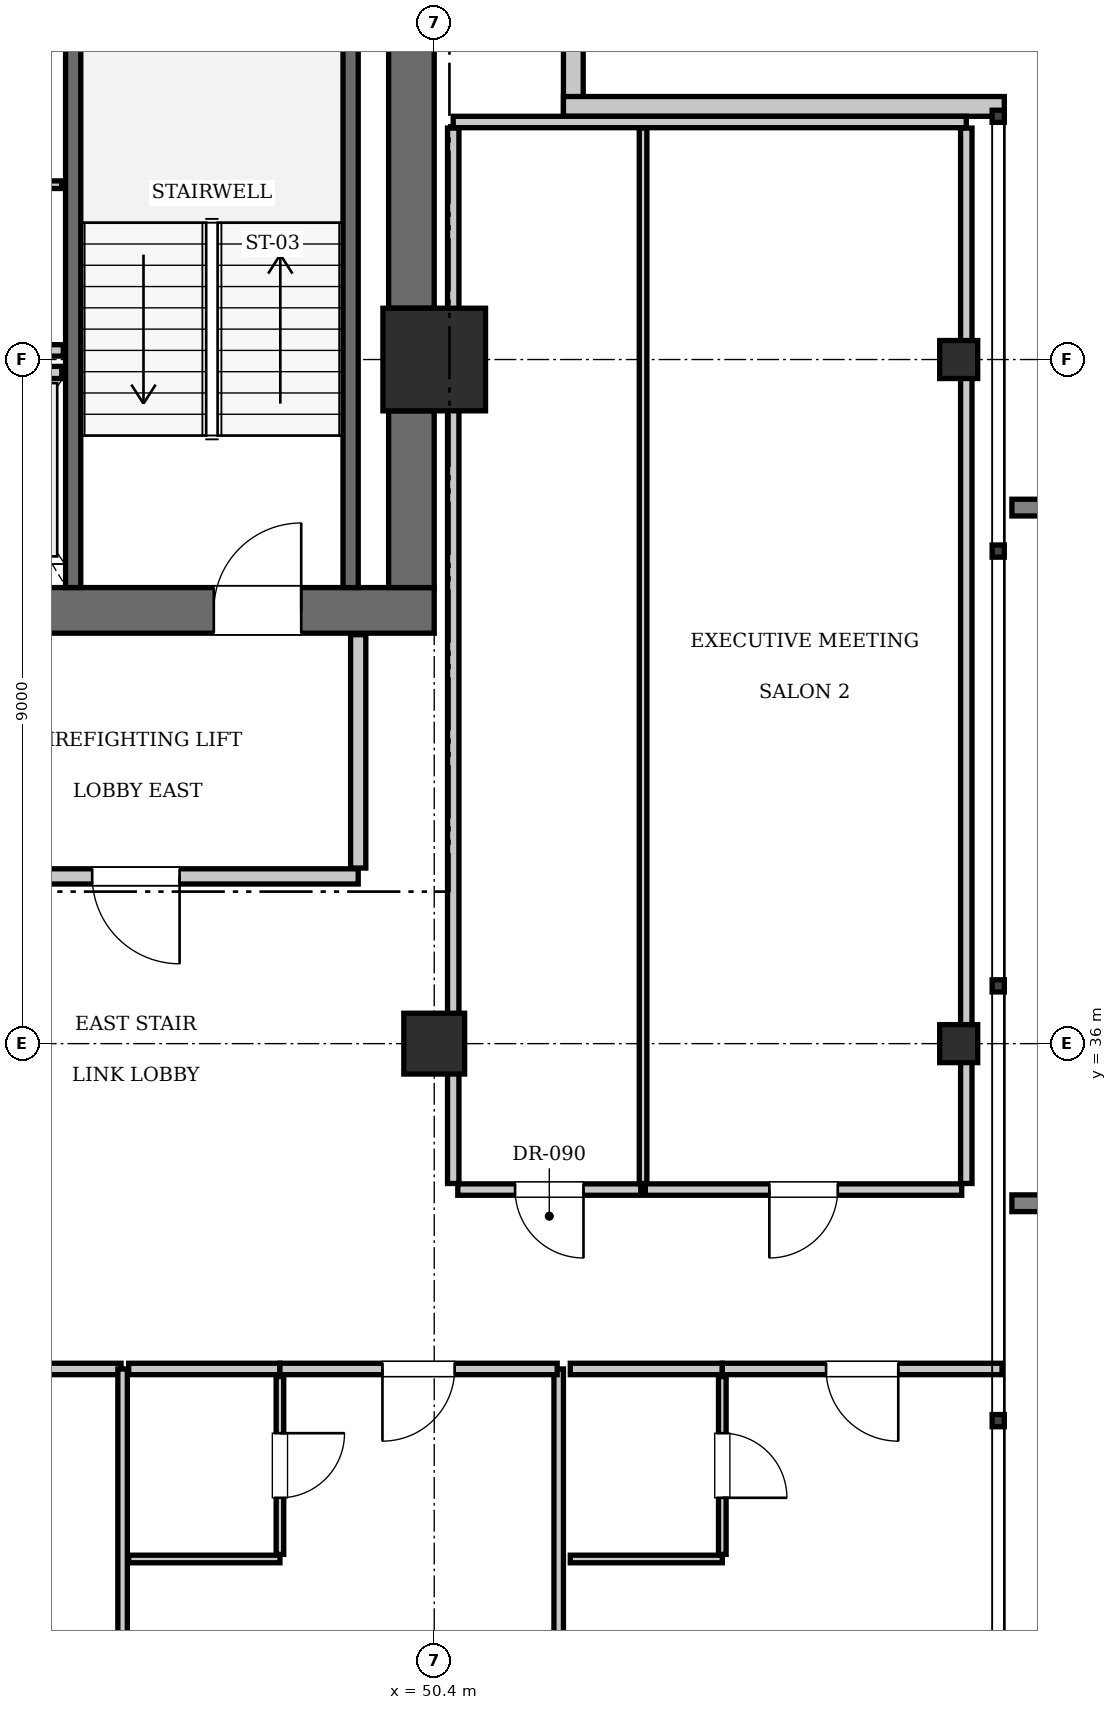
"""IFC4 building model, lengths in metres.
Left out: names, types, materials, properties, quantities, classifications, styles, units other than length and angle.
Written with IfcOpenShell. Run it as: python <this file> out.ifc"""

import sys

from ifc_helpers import new_model, si_unit, direction, frame, frame_2d, origin, origin_2d, place, context, subcontext, project, spatial, rectangle, i_section, extrude, element, fill, save


model = new_model("IFC4")
c1 = context("Model", 3, precision=1e-05, world=origin(), true_north=direction((0.0, 1.0)))
c2 = subcontext(c1, "Body", "Model", "MODEL_VIEW")
j1 = project(units=[si_unit("LENGTHUNIT", "METRE"), si_unit("PLANEANGLEUNIT", "RADIAN")], contexts=[c1])
p1 = place(None, origin())
s1 = spatial("IfcSite", under=j1, at=p1, CompositionType="ELEMENT")
p2 = place(p1, origin())
s2 = spatial("IfcBuilding", under=s1, at=p2, CompositionType="ELEMENT")
p3 = place(p2, frame((0.0, 0.0, 329.7)))
s3 = spatial("IfcBuildingStorey", under=s2, at=p3, CompositionType="ELEMENT", Elevation=329.7)
p4 = place(p3, frame((50.4, 45.0, 0.0), z_axis=(0.0, 0.0, 1.0), x_axis=(1.0, 0.0, 0.0)))
e1 = element("IfcColumn", 1, at=p4, inside=s3, PredefinedType="COLUMN", context=c2, shape_type="SweptSolid", body=[
    extrude(rectangle(XDim=1.35, YDim=1.35, at=origin_2d()), origin(), (0.0, 0.0, 1.0), 3.85),
])
p5 = place(p3, frame((43.6, 41.7, 0.0), z_axis=(0.0, 0.0, 1.0), x_axis=(1.0, 0.0, 0.0)))
e2 = element("IfcWall", 2, at=p5, inside=s3, PredefinedType="SHEAR", context=c2, shape_type="SweptSolid", body=[
    extrude(rectangle(XDim=6.8, YDim=0.6, at=frame_2d((3.4, 0.0))), origin(), (0.0, 0.0, 1.0), 3.85),
])
p6 = place(p5, frame((3.9, 0.0, 0.0)))
e3 = element("IfcOpeningElement", 3, at=p6, cuts=e2, PredefinedType="OPENING", context=c2, shape_type="SweptSolid", body=[
    extrude(rectangle(XDim=1.15, YDim=2.15, at=frame_2d((0.575, 1.075))), frame((0.0, 0.31, 0.0), z_axis=(0.0, -1.0, 0.0), x_axis=(1.0, 0.0, 0.0)), (0.0, 0.0, 1.0), 0.62),
])
p7 = place(p5, frame((0.55, 0.0, 0.0)))
e4 = element("IfcOpeningElement", 4, at=p7, cuts=e2, PredefinedType="OPENING", context=c2, shape_type="SweptSolid", body=[
    extrude(rectangle(XDim=1.1, YDim=2.2, at=frame_2d((0.55, 1.1))), frame((0.0, 0.31, 0.0), z_axis=(0.0, -1.0, 0.0), x_axis=(1.0, 0.0, 0.0)), (0.0, 0.0, 1.0), 0.62),
])
p8 = place(p3, frame((50.1, 42.0, 0.0), z_axis=(0.0, 0.0, 1.0), x_axis=(0.0, 1.0, 0.0)))
e5 = element("IfcWall", 5, at=p8, inside=s3, PredefinedType="SHEAR", context=c2, shape_type="SweptSolid", body=[
    extrude(rectangle(XDim=2.325, YDim=0.6, at=frame_2d((1.163, 0.0))), origin(), (0.0, 0.0, 1.0), 3.85),
])
p9 = place(p3, frame((50.1, 45.675, 0.0), z_axis=(0.0, 0.0, 1.0), x_axis=(0.0, 1.0, 0.0)))
e6 = element("IfcWall", 6, at=p9, inside=s3, PredefinedType="SHEAR", context=c2, shape_type="SweptSolid", body=[
    extrude(rectangle(XDim=7.725, YDim=0.6, at=frame_2d((3.862, 0.0))), origin(), (0.0, 0.0, 1.0), 3.85),
])
p10 = place(p3, frame((50.4, 36.0, 0.0), z_axis=(0.0, 0.0, 1.0), x_axis=(1.0, 0.0, 0.0)))
e7 = element("IfcColumn", 7, at=p10, inside=s3, PredefinedType="COLUMN", context=c2, shape_type="SweptSolid", body=[
    extrude(rectangle(XDim=0.8, YDim=0.8, at=origin_2d()), origin(), (0.0, 0.0, 1.0), 3.85),
])
for number, where, z_axis, x_axis in (
    (8, (57.3, 36.0, 0.0), (0.0, 0.0, 1.0), (1.0, 0.0, 0.0)),
    (9, (57.3, 45.0, 0.0), (0.0, 0.0, 1.0), (1.0, 0.0, 0.0)),
):
    element("IfcColumn", number, at=place(p3, frame(where, z_axis=z_axis, x_axis=x_axis)), inside=s3, PredefinedType="COLUMN", context=c2, shape_type="SweptSolid", body=[
        extrude(i_section(OverallWidth=0.5, OverallDepth=0.5, WebThickness=0.022, FlangeThickness=0.032, at=origin_2d()), origin(), (0.0, 0.0, 1.0), 3.85),
    ])
p11 = place(p3, frame((45.65, 42.0, 0.0), z_axis=(0.0, 0.0, 1.0), x_axis=(0.0, 1.0, 0.0)))
e10 = element("IfcWall", 10, at=p11, inside=s3, PredefinedType="SOLIDWALL", context=c2, shape_type="SweptSolid", body=[
    extrude(rectangle(XDim=9.15, YDim=0.2, at=frame_2d((4.575, 0.0))), origin(), (0.0, 0.0, 1.0), 3.61),
])
p12 = place(p3, frame((49.3, 42.0, 0.0), z_axis=(0.0, 0.0, 1.0), x_axis=(0.0, 1.0, 0.0)))
e11 = element("IfcWall", 11, at=p12, inside=s3, PredefinedType="SOLIDWALL", context=c2, shape_type="SweptSolid", body=[
    extrude(rectangle(XDim=9.12, YDim=0.2, at=frame_2d((4.56, 0.0))), origin(), (0.0, 0.0, 1.0), 3.61),
])
p13 = place(p3, frame((43.9, 44.83, 0.0), z_axis=(0.0, 0.0, 1.0), x_axis=(1.0, 0.0, 0.0)))
e12 = element("IfcWall", 12, at=p13, inside=s3, PredefinedType="SOLIDWALL", context=c2, shape_type="SweptSolid", body=[
    extrude(rectangle(XDim=1.6, YDim=0.16, at=frame_2d((0.8, 0.0))), origin(), (0.0, 0.0, 1.0), 3.61),
])
p14 = place(p3, frame((52.23, 54.0, 0.0), z_axis=(0.0, 0.0, 1.0), x_axis=(0.0, -1.0, 0.0)))
e13 = element("IfcWall", 13, at=p14, inside=s3, PredefinedType="SOLIDWALL", context=c2, shape_type="SweptSolid", body=[
    extrude(rectangle(XDim=5.8, YDim=0.26, at=frame_2d((2.9, 0.0))), origin(), (0.0, 0.0, 1.0), 3.61),
])
p15 = place(p3, frame((52.1, 48.33, 0.0), z_axis=(0.0, 0.0, 1.0), x_axis=(1.0, 0.0, 0.0)))
e14 = element("IfcWall", 14, at=p15, inside=s3, PredefinedType="SOLIDWALL", context=c2, shape_type="SweptSolid", body=[
    extrude(rectangle(XDim=5.8, YDim=0.26, at=frame_2d((2.9, 0.0))), origin(), (0.0, 0.0, 1.0), 3.61),
])
p16 = place(p3, frame((43.6, 38.2, 0.0), z_axis=(0.0, 0.0, 1.0), x_axis=(1.0, 0.0, 0.0)))
e15 = element("IfcWall", 15, at=p16, inside=s3, PredefinedType="PARTITIONING", context=c2, shape_type="SweptSolid", body=[
    extrude(rectangle(XDim=5.8, YDim=0.2, at=frame_2d((2.9, 0.0))), origin(), (0.0, 0.0, 1.0), 3.61),
])
p17 = place(p16, frame((2.3, 0.0, 0.0)))
e16 = element("IfcOpeningElement", 16, at=p17, cuts=e15, PredefinedType="OPENING", context=c2, shape_type="SweptSolid", body=[
    extrude(rectangle(XDim=1.15, YDim=2.15, at=frame_2d((0.575, 1.075))), frame((0.0, 0.11, 0.0), z_axis=(0.0, -1.0, 0.0), x_axis=(1.0, 0.0, 0.0)), (0.0, 0.0, 1.0), 0.22),
])
p18 = place(p3, frame((49.4, 38.31, 0.0), z_axis=(0.0, 0.0, 1.0), x_axis=(0.0, 1.0, 0.0)))
e17 = element("IfcWall", 17, at=p18, inside=s3, PredefinedType="PARTITIONING", context=c2, shape_type="SweptSolid", body=[
    extrude(rectangle(XDim=3.07, YDim=0.2, at=frame_2d((1.535, 0.0))), origin(), (0.0, 0.0, 1.0), 3.61),
])
p19 = place(p3, frame((42.4, 47.3, 0.0), z_axis=(0.0, 0.0, 1.0), x_axis=(1.0, 0.0, 0.0)))
e18 = element("IfcWall", 18, at=p19, inside=s3, PredefinedType="PARTITIONING", context=c2, shape_type="SweptSolid", body=[
    extrude(rectangle(XDim=3.1, YDim=0.1, at=frame_2d((1.55, 0.0))), origin(), (0.0, 0.0, 1.0), 3.61),
])
p20 = place(p3, frame((42.38, 45.12, 0.0), z_axis=(0.0, 0.0, 1.0), x_axis=(1.0, 0.0, 0.0)))
e19 = element("IfcWall", 19, at=p20, inside=s3, PredefinedType="PARTITIONING", context=c2, shape_type="SweptSolid", body=[
    extrude(rectangle(XDim=3.14, YDim=0.15, at=frame_2d((1.57, 0.0))), origin(), (0.0, 0.0, 1.0), 3.61),
])
p21 = place(p3, frame((50.65, 48.125, 0.0), z_axis=(0.0, 0.0, 1.0), x_axis=(1.0, 0.0, 0.0)))
e20 = element("IfcWall", 20, at=p21, inside=s3, PredefinedType="PARTITIONING", context=c2, shape_type="SweptSolid", body=[
    extrude(rectangle(XDim=6.75, YDim=0.15, at=frame_2d((3.375, 0.0))), origin(), (0.0, 0.0, 1.0), 3.61),
])
p22 = place(p3, frame((50.65, 34.16, 0.0), z_axis=(0.0, 0.0, 1.0), x_axis=(0.0, 1.0, 0.0)))
e21 = element("IfcWall", 21, at=p22, inside=s3, PredefinedType="PARTITIONING", context=c2, shape_type="SweptSolid", body=[
    extrude(rectangle(XDim=13.885, YDim=0.15, at=frame_2d((6.942, 0.0))), origin(), (0.0, 0.0, 1.0), 3.61),
])
p23 = place(p3, frame((57.4, 34.16, 0.0), z_axis=(0.0, 0.0, 1.0), x_axis=(0.0, 1.0, 0.0)))
e22 = element("IfcWall", 22, at=p23, inside=s3, PredefinedType="PARTITIONING", context=c2, shape_type="SweptSolid", body=[
    extrude(rectangle(XDim=13.885, YDim=0.15, at=frame_2d((6.942, 0.0))), origin(), (0.0, 0.0, 1.0), 3.141),
])
p24 = place(p3, frame((50.71, 34.08, 0.0), z_axis=(0.0, 0.0, 1.0), x_axis=(1.0, 0.0, 0.0)))
e23 = element("IfcWall", 23, at=p24, inside=s3, PredefinedType="PARTITIONING", context=c2, shape_type="SweptSolid", body=[
    extrude(rectangle(XDim=2.407, YDim=0.15, at=frame_2d((1.204, 0.0))), origin(), (0.0, 0.0, 1.0), 3.61),
])
p25 = place(p24, frame((0.754, 0.0, 0.0)))
e24 = element("IfcOpeningElement", 24, at=p25, cuts=e23, PredefinedType="OPENING", context=c2, shape_type="SweptSolid", body=[
    extrude(rectangle(XDim=0.9, YDim=2.1, at=frame_2d((0.45, 1.05))), frame((0.0, 0.085, 0.0), z_axis=(0.0, -1.0, 0.0), x_axis=(1.0, 0.0, 0.0)), (0.0, 0.0, 1.0), 0.17),
])
p26 = place(p3, frame((53.147, 34.16, 0.0), z_axis=(0.0, 0.0, 1.0), x_axis=(0.0, 1.0, 0.0)))
e25 = element("IfcWall", 25, at=p26, inside=s3, PredefinedType="PARTITIONING", context=c2, shape_type="SweptSolid", body=[
    extrude(rectangle(XDim=13.885, YDim=0.1, at=frame_2d((6.942, 0.0))), origin(), (0.0, 0.0, 1.0), 3.61),
])
p27 = place(p3, frame((53.177, 34.08, 0.0), z_axis=(0.0, 0.0, 1.0), x_axis=(1.0, 0.0, 0.0)))
e26 = element("IfcWall", 26, at=p27, inside=s3, PredefinedType="PARTITIONING", context=c2, shape_type="SweptSolid", body=[
    extrude(rectangle(XDim=4.163, YDim=0.15, at=frame_2d((2.081, 0.0))), origin(), (0.0, 0.0, 1.0), 3.61),
])
p28 = place(p27, frame((1.631, 0.0, 0.0)))
e27 = element("IfcOpeningElement", 27, at=p28, cuts=e26, PredefinedType="OPENING", context=c2, shape_type="SweptSolid", body=[
    extrude(rectangle(XDim=0.9, YDim=2.1, at=frame_2d((0.45, 1.05))), frame((0.0, 0.085, 0.0), z_axis=(0.0, -1.0, 0.0), x_axis=(1.0, 0.0, 0.0)), (0.0, 0.0, 1.0), 0.17),
])
p29 = place(p3, frame((52.038, 19.34, 0.0), z_axis=(0.0, 0.0, 1.0), x_axis=(0.0, 1.0, 0.0)))
e28 = element("IfcWall", 28, at=p29, inside=s3, PredefinedType="PARTITIONING", context=c2, shape_type="SweptSolid", body=[
    extrude(rectangle(XDim=12.38, YDim=0.125, at=frame_2d((6.19, 0.0))), origin(), (0.0, 0.0, 1.0), 3.61),
])
p30 = place(p3, frame((42.65, 31.72, 0.0), z_axis=(0.0, 0.0, 1.0), x_axis=(1.0, 0.0, 0.0)))
e29 = element("IfcWall", 29, at=p30, inside=s3, PredefinedType="PARTITIONING", context=c2, shape_type="SweptSolid", body=[
    extrude(rectangle(XDim=3.63, YDim=0.15, at=frame_2d((1.815, 0.0))), origin(), (0.0, 0.0, 1.0), 3.61),
])
p31 = place(p30, frame((1.34, 0.0, 0.0)))
e30 = element("IfcOpeningElement", 30, at=p31, cuts=e29, PredefinedType="OPENING", context=c2, shape_type="SweptSolid", body=[
    extrude(rectangle(XDim=0.95, YDim=2.15, at=frame_2d((0.475, 1.075))), frame((0.0, 0.085, 0.0), z_axis=(0.0, -1.0, 0.0), x_axis=(1.0, 0.0, 0.0)), (0.0, 0.0, 1.0), 0.17),
])
p32 = place(p3, frame((46.3, 13.9, 0.0), z_axis=(0.0, 0.0, 1.0), x_axis=(0.0, 1.0, 0.0)))
e31 = element("IfcWall", 31, at=p32, inside=s3, PredefinedType="PARTITIONING", context=c2, shape_type="SweptSolid", body=[
    extrude(rectangle(XDim=17.82, YDim=0.125, at=frame_2d((8.91, 0.0))), origin(), (0.0, 0.0, 1.0), 3.352),
])
p33 = place(p3, frame((46.38, 31.72, 0.0), z_axis=(0.0, 0.0, 1.0), x_axis=(1.0, 0.0, 0.0)))
e32 = element("IfcWall", 32, at=p33, inside=s3, PredefinedType="PARTITIONING", context=c2, shape_type="SweptSolid", body=[
    extrude(rectangle(XDim=1.99, YDim=0.15, at=frame_2d((0.995, 0.0))), origin(), (0.0, 0.0, 1.0), 3.61),
])
p34 = place(p3, frame((46.38, 29.22, 0.0), z_axis=(0.0, 0.0, 1.0), x_axis=(1.0, 0.0, 0.0)))
e33 = element("IfcWall", 33, at=p34, inside=s3, PredefinedType="PARTITIONING", context=c2, shape_type="SweptSolid", body=[
    extrude(rectangle(XDim=1.99, YDim=0.1, at=frame_2d((0.995, 0.0))), origin(), (0.0, 0.0, 1.0), 3.61),
])
p35 = place(p3, frame((48.37, 29.28, 0.0), z_axis=(0.0, 0.0, 1.0), x_axis=(0.0, 1.0, 0.0)))
e34 = element("IfcWall", 34, at=p35, inside=s3, PredefinedType="PARTITIONING", context=c2, shape_type="SweptSolid", body=[
    extrude(rectangle(XDim=2.34, YDim=0.1, at=frame_2d((1.17, 0.0))), origin(), (0.0, 0.0, 1.0), 3.61),
])
p36 = place(p35, frame((0.745, 0.0, 0.0)))
e35 = element("IfcOpeningElement", 35, at=p36, cuts=e34, PredefinedType="OPENING", context=c2, shape_type="SweptSolid", body=[
    extrude(rectangle(XDim=0.85, YDim=2.1, at=frame_2d((0.425, 1.05))), frame((0.0, 0.06, 0.0), z_axis=(0.0, -1.0, 0.0), x_axis=(1.0, 0.0, 0.0)), (0.0, 0.0, 1.0), 0.12),
])
p37 = place(p3, frame((48.37, 31.72, 0.0), z_axis=(0.0, 0.0, 1.0), x_axis=(1.0, 0.0, 0.0)))
e36 = element("IfcWall", 36, at=p37, inside=s3, PredefinedType="PARTITIONING", context=c2, shape_type="SweptSolid", body=[
    extrude(rectangle(XDim=3.647, YDim=0.15, at=frame_2d((1.824, 0.0))), origin(), (0.0, 0.0, 1.0), 3.61),
])
p38 = place(p37, frame((1.349, 0.0, 0.0)))
e37 = element("IfcOpeningElement", 37, at=p38, cuts=e36, PredefinedType="OPENING", context=c2, shape_type="SweptSolid", body=[
    extrude(rectangle(XDim=0.95, YDim=2.15, at=frame_2d((0.475, 1.075))), frame((0.0, 0.085, 0.0), z_axis=(0.0, -1.0, 0.0), x_axis=(1.0, 0.0, 0.0)), (0.0, 0.0, 1.0), 0.17),
])
p39 = place(p3, frame((52.19, 31.72, 0.0), z_axis=(0.0, 0.0, 1.0), x_axis=(1.0, 0.0, 0.0)))
e38 = element("IfcWall", 38, at=p39, inside=s3, PredefinedType="PARTITIONING", context=c2, shape_type="SweptSolid", body=[
    extrude(rectangle(XDim=2.0, YDim=0.15, at=frame_2d((1.0, 0.0))), origin(), (0.0, 0.0, 1.0), 3.61),
])
p40 = place(p3, frame((52.19, 29.22, 0.0), z_axis=(0.0, 0.0, 1.0), x_axis=(1.0, 0.0, 0.0)))
e39 = element("IfcWall", 39, at=p40, inside=s3, PredefinedType="PARTITIONING", context=c2, shape_type="SweptSolid", body=[
    extrude(rectangle(XDim=2.0, YDim=0.1, at=frame_2d((1.0, 0.0))), origin(), (0.0, 0.0, 1.0), 3.61),
])
p41 = place(p3, frame((54.19, 29.28, 0.0), z_axis=(0.0, 0.0, 1.0), x_axis=(0.0, 1.0, 0.0)))
e40 = element("IfcWall", 40, at=p41, inside=s3, PredefinedType="PARTITIONING", context=c2, shape_type="SweptSolid", body=[
    extrude(rectangle(XDim=2.34, YDim=0.1, at=frame_2d((1.17, 0.0))), origin(), (0.0, 0.0, 1.0), 3.61),
])
p42 = place(p41, frame((0.745, 0.0, 0.0)))
e41 = element("IfcOpeningElement", 41, at=p42, cuts=e40, PredefinedType="OPENING", context=c2, shape_type="SweptSolid", body=[
    extrude(rectangle(XDim=0.85, YDim=2.1, at=frame_2d((0.425, 1.05))), frame((0.0, 0.06, 0.0), z_axis=(0.0, -1.0, 0.0), x_axis=(1.0, 0.0, 0.0)), (0.0, 0.0, 1.0), 0.12),
])
p43 = place(p3, frame((54.19, 31.72, 0.0), z_axis=(0.0, 0.0, 1.0), x_axis=(1.0, 0.0, 0.0)))
e42 = element("IfcWall", 42, at=p43, inside=s3, PredefinedType="PARTITIONING", context=c2, shape_type="SweptSolid", body=[
    extrude(rectangle(XDim=3.68, YDim=0.15, at=frame_2d((1.84, 0.0))), origin(), (0.0, 0.0, 1.0), 3.61),
])
p44 = place(p43, frame((1.365, 0.0, 0.0)))
e43 = element("IfcOpeningElement", 43, at=p44, cuts=e42, PredefinedType="OPENING", context=c2, shape_type="SweptSolid", body=[
    extrude(rectangle(XDim=0.95, YDim=2.15, at=frame_2d((0.475, 1.075))), frame((0.0, 0.085, 0.0), z_axis=(0.0, -1.0, 0.0), x_axis=(1.0, 0.0, 0.0)), (0.0, 0.0, 1.0), 0.17),
])
p45 = place(p6, origin())
e44 = element("IfcDoor", 44, at=p45, inside=s3, OperationType="SINGLE_SWING_RIGHT", PredefinedType="DOOR", context=c2, shape_type="SweptSolid", body=[
    extrude(rectangle(XDim=1.15, YDim=2.15, at=frame_2d((0.575, 1.075))), frame((0.0, 0.025, 0.0), z_axis=(0.0, -1.0, 0.0), x_axis=(1.0, 0.0, 0.0)), (0.0, 0.0, 1.0), 0.05),
])
fill(e3, e44)
p46 = place(p17, frame((1.15, 0.0, 0.0), z_axis=(0.0, 0.0, 1.0), x_axis=(-1.0, 0.0, 0.0)))
e45 = element("IfcDoor", 45, at=p46, inside=s3, OperationType="SINGLE_SWING_LEFT", PredefinedType="DOOR", context=c2, shape_type="SweptSolid", body=[
    extrude(rectangle(XDim=1.15, YDim=2.15, at=frame_2d((0.575, 1.075))), frame((0.0, 0.025, 0.0), z_axis=(0.0, -1.0, 0.0), x_axis=(1.0, 0.0, 0.0)), (0.0, 0.0, 1.0), 0.05),
])
fill(e16, e45)
p47 = place(p25, frame((0.9, 0.0, 0.0), z_axis=(0.0, 0.0, 1.0), x_axis=(-1.0, 0.0, 0.0)))
e46 = element("IfcDoor", 46, at=p47, inside=s3, OperationType="SINGLE_SWING_LEFT", PredefinedType="DOOR", context=c2, shape_type="SweptSolid", body=[
    extrude(rectangle(XDim=0.9, YDim=2.1, at=frame_2d((0.45, 1.05))), frame((0.0, 0.025, 0.0), z_axis=(0.0, -1.0, 0.0), x_axis=(1.0, 0.0, 0.0)), (0.0, 0.0, 1.0), 0.05),
])
fill(e24, e46)
p48 = place(p28, frame((0.9, 0.0, 0.0), z_axis=(0.0, 0.0, 1.0), x_axis=(-1.0, 0.0, 0.0)))
e47 = element("IfcDoor", 47, at=p48, inside=s3, OperationType="SINGLE_SWING_RIGHT", PredefinedType="DOOR", context=c2, shape_type="SweptSolid", body=[
    extrude(rectangle(XDim=0.9, YDim=2.1, at=frame_2d((0.45, 1.05))), frame((0.0, 0.025, 0.0), z_axis=(0.0, -1.0, 0.0), x_axis=(1.0, 0.0, 0.0)), (0.0, 0.0, 1.0), 0.05),
])
fill(e27, e47)
p49 = place(p36, frame((0.85, 0.0, 0.0), z_axis=(0.0, 0.0, 1.0), x_axis=(-1.0, 0.0, 0.0)))
e48 = element("IfcDoor", 48, at=p49, inside=s3, OperationType="SINGLE_SWING_LEFT", PredefinedType="DOOR", context=c2, shape_type="SweptSolid", body=[
    extrude(rectangle(XDim=0.85, YDim=2.1, at=frame_2d((0.425, 1.05))), frame((0.0, 0.025, 0.0), z_axis=(0.0, -1.0, 0.0), x_axis=(1.0, 0.0, 0.0)), (0.0, 0.0, 1.0), 0.05),
])
fill(e35, e48)
p50 = place(p38, frame((0.95, 0.0, 0.0), z_axis=(0.0, 0.0, 1.0), x_axis=(-1.0, 0.0, 0.0)))
e49 = element("IfcDoor", 49, at=p50, inside=s3, OperationType="SINGLE_SWING_RIGHT", PredefinedType="DOOR", context=c2, shape_type="SweptSolid", body=[
    extrude(rectangle(XDim=0.95, YDim=2.15, at=frame_2d((0.475, 1.075))), frame((0.0, 0.025, 0.0), z_axis=(0.0, -1.0, 0.0), x_axis=(1.0, 0.0, 0.0)), (0.0, 0.0, 1.0), 0.05),
])
fill(e37, e49)
p51 = place(p42, frame((0.85, 0.0, 0.0), z_axis=(0.0, 0.0, 1.0), x_axis=(-1.0, 0.0, 0.0)))
e50 = element("IfcDoor", 50, at=p51, inside=s3, OperationType="SINGLE_SWING_RIGHT", PredefinedType="DOOR", context=c2, shape_type="SweptSolid", body=[
    extrude(rectangle(XDim=0.85, YDim=2.1, at=frame_2d((0.425, 1.05))), frame((0.0, 0.025, 0.0), z_axis=(0.0, -1.0, 0.0), x_axis=(1.0, 0.0, 0.0)), (0.0, 0.0, 1.0), 0.05),
])
fill(e41, e50)
p52 = place(p44, frame((0.95, 0.0, 0.0), z_axis=(0.0, 0.0, 1.0), x_axis=(-1.0, 0.0, 0.0)))
e51 = element("IfcDoor", 51, at=p52, inside=s3, OperationType="SINGLE_SWING_LEFT", PredefinedType="DOOR", context=c2, shape_type="SweptSolid", body=[
    extrude(rectangle(XDim=0.95, YDim=2.15, at=frame_2d((0.475, 1.075))), frame((0.0, 0.025, 0.0), z_axis=(0.0, -1.0, 0.0), x_axis=(1.0, 0.0, 0.0)), (0.0, 0.0, 1.0), 0.05),
])
fill(e43, e51)
save(model, sys.argv[1])
